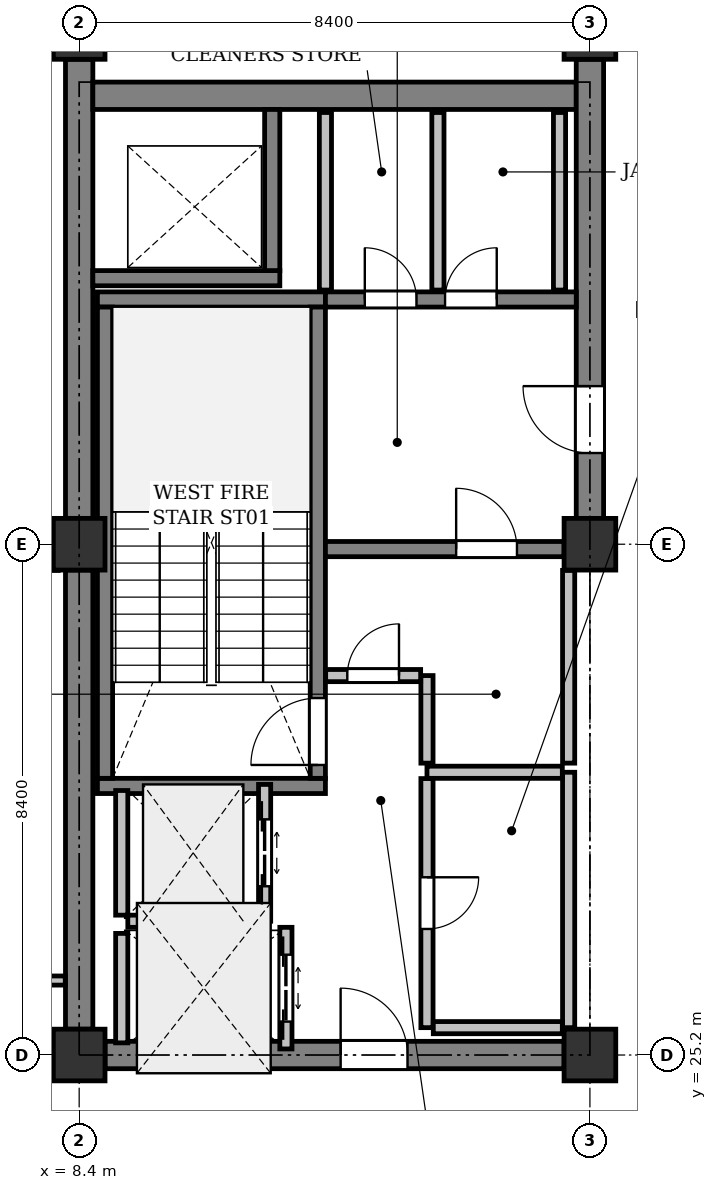
"""IFC4 building model, lengths in metres.
Left out: names, types, materials, properties, quantities, classifications, styles, units other than length and angle.
Written with IfcOpenShell. Run it as: python <this file> out.ifc"""

import sys

from ifc_helpers import new_model, si_unit, direction, frame, frame_2d, origin, origin_2d, place, context, subcontext, project, spatial, rectangle, extrude, element, fill, save


model = new_model("IFC4")
c1 = context("Model", 3, precision=1e-05, world=origin(), true_north=direction((0.0, 1.0)))
c2 = subcontext(c1, "Body", "Model", "MODEL_VIEW")
j1 = project(units=[si_unit("LENGTHUNIT", "METRE"), si_unit("PLANEANGLEUNIT", "RADIAN")], contexts=[c1])
p1 = place(None, origin())
s1 = spatial("IfcSite", under=j1, at=p1, CompositionType="ELEMENT")
p2 = place(p1, origin())
s2 = spatial("IfcBuilding", under=s1, at=p2, CompositionType="ELEMENT")
p3 = place(p2, frame((0.0, 0.0, 290.2)))
s3 = spatial("IfcBuildingStorey", under=s2, at=p3, CompositionType="ELEMENT", Elevation=290.2)
for number, where, z_axis, x_axis in (
    (1, (8.4, 25.2, 0.0), (0.0, 0.0, 1.0), (1.0, 0.0, 0.0)),
    (2, (8.4, 33.6, 0.0), (0.0, 0.0, 1.0), (1.0, 0.0, 0.0)),
    (3, (8.4, 42.0, 0.0), (0.0, 0.0, 1.0), (1.0, 0.0, 0.0)),
    (4, (16.8, 25.2, 0.0), (0.0, 0.0, 1.0), (1.0, 0.0, 0.0)),
    (5, (16.8, 33.6, 0.0), (0.0, 0.0, 1.0), (1.0, 0.0, 0.0)),
    (6, (16.8, 42.0, 0.0), (0.0, 0.0, 1.0), (1.0, 0.0, 0.0)),
):
    element("IfcColumn", number, at=place(p3, frame(where, z_axis=z_axis, x_axis=x_axis)), inside=s3, PredefinedType="COLUMN", context=c2, shape_type="SweptSolid", body=[
        extrude(rectangle(XDim=0.85, YDim=0.85, at=origin_2d()), origin(), (0.0, 0.0, 1.0), 4.0),
    ])
for number, where, z_axis, x_axis in (
    (7, (8.4, 25.625, 0.0), (0.0, 0.0, 1.0), (0.0, 1.0, 0.0)),
    (8, (8.4, 34.025, 0.0), (0.0, 0.0, 1.0), (0.0, 1.0, 0.0)),
):
    element("IfcWall", number, at=place(p3, frame(where, z_axis=z_axis, x_axis=x_axis)), inside=s3, PredefinedType="SHEAR", context=c2, shape_type="SweptSolid", body=[
        extrude(rectangle(XDim=7.55, YDim=0.45, at=frame_2d((3.775, 0.0))), origin(), (0.0, 0.0, 1.0), 3.725),
    ])
p4 = place(p3, frame((8.625, 40.975, 0.0), z_axis=(0.0, 0.0, 1.0), x_axis=(1.0, 0.0, 0.0)))
e9 = element("IfcWall", 9, at=p4, inside=s3, PredefinedType="SHEAR", context=c2, shape_type="SweptSolid", body=[
    extrude(rectangle(XDim=7.95, YDim=0.45, at=frame_2d((3.975, 0.0))), origin(), (0.0, 0.0, 1.0), 3.725),
])
p5 = place(p3, frame((16.8, 34.025, 0.0), z_axis=(0.0, 0.0, 1.0), x_axis=(0.0, 1.0, 0.0)))
e10 = element("IfcWall", 10, at=p5, inside=s3, PredefinedType="SHEAR", context=c2, shape_type="SweptSolid", body=[
    extrude(rectangle(XDim=7.55, YDim=0.45, at=frame_2d((3.775, 0.0))), origin(), (0.0, 0.0, 1.0), 3.725),
])
p6 = place(p5, frame((1.075, 0.0, 0.0)))
e11 = element("IfcOpeningElement", 11, at=p6, cuts=e10, PredefinedType="OPENING", context=c2, shape_type="SweptSolid", body=[
    extrude(rectangle(XDim=1.1, YDim=2.15, at=frame_2d((0.55, 1.075))), frame((0.0, 0.235, 0.0), z_axis=(0.0, -1.0, 0.0), x_axis=(1.0, 0.0, 0.0)), (0.0, 0.0, 1.0), 0.47),
])
p7 = place(p3, frame((8.825, 25.2, 0.0), z_axis=(0.0, 0.0, 1.0), x_axis=(1.0, 0.0, 0.0)))
e12 = element("IfcWall", 12, at=p7, inside=s3, PredefinedType="SHEAR", context=c2, shape_type="SweptSolid", body=[
    extrude(rectangle(XDim=7.55, YDim=0.45, at=frame_2d((3.775, 0.0))), origin(), (0.0, 0.0, 1.0), 3.725),
])
p8 = place(p7, frame((3.875, 0.0, 0.0)))
e13 = element("IfcOpeningElement", 13, at=p8, cuts=e12, PredefinedType="OPENING", context=c2, shape_type="SweptSolid", body=[
    extrude(rectangle(XDim=1.1, YDim=2.15, at=frame_2d((0.55, 1.075))), frame((0.0, 0.235, 0.0), z_axis=(0.0, -1.0, 0.0), x_axis=(1.0, 0.0, 0.0)), (0.0, 0.0, 1.0), 0.47),
])
for number, where, z_axis, x_axis in (
    (14, (12.45, 29.625, 0.0), (0.0, 0.0, 1.0), (-1.0, 0.0, 0.0)),
    (15, (12.45, 37.625, 0.0), (0.0, 0.0, 1.0), (-1.0, 0.0, 0.0)),
):
    element("IfcWall", number, at=place(p3, frame(where, z_axis=z_axis, x_axis=x_axis)), inside=s3, PredefinedType="SHEAR", context=c2, shape_type="SweptSolid", body=[
        extrude(rectangle(XDim=3.75, YDim=0.25, at=frame_2d((1.875, 0.0))), origin(), (0.0, 0.0, 1.0), 3.725),
    ])
p9 = place(p3, frame((12.325, 29.75, 0.0), z_axis=(0.0, 0.0, 1.0), x_axis=(0.0, 1.0, 0.0)))
e16 = element("IfcWall", 16, at=p9, inside=s3, PredefinedType="SHEAR", context=c2, shape_type="SweptSolid", body=[
    extrude(rectangle(XDim=7.75, YDim=0.25, at=frame_2d((3.875, 0.0))), origin(), (0.0, 0.0, 1.0), 3.725),
])
p10 = place(p9, frame((0.22, 0.0, 0.0)))
e17 = element("IfcOpeningElement", 17, at=p10, cuts=e16, PredefinedType="OPENING", context=c2, shape_type="SweptSolid", body=[
    extrude(rectangle(XDim=1.1, YDim=2.15, at=frame_2d((0.55, 1.075))), frame((0.0, 0.135, 0.0), z_axis=(0.0, -1.0, 0.0), x_axis=(1.0, 0.0, 0.0)), (0.0, 0.0, 1.0), 0.27),
])
p11 = place(p3, frame((8.825, 29.75, 0.0), z_axis=(0.0, 0.0, 1.0), x_axis=(0.0, 1.0, 0.0)))
e18 = element("IfcWall", 18, at=p11, inside=s3, PredefinedType="SHEAR", context=c2, shape_type="SweptSolid", body=[
    extrude(rectangle(XDim=7.75, YDim=0.25, at=frame_2d((3.875, 0.0))), origin(), (0.0, 0.0, 1.0), 3.725),
])
p12 = place(p3, frame((8.625, 37.975, 0.0), z_axis=(0.0, 0.0, 1.0), x_axis=(1.0, 0.0, 0.0)))
e19 = element("IfcWall", 19, at=p12, inside=s3, PredefinedType="SHEAR", context=c2, shape_type="SweptSolid", body=[
    extrude(rectangle(XDim=3.075, YDim=0.25, at=frame_2d((1.538, 0.0))), origin(), (0.0, 0.0, 1.0), 3.725),
])
p13 = place(p3, frame((11.575, 38.1, 0.0), z_axis=(0.0, 0.0, 1.0), x_axis=(0.0, 1.0, 0.0)))
e20 = element("IfcWall", 20, at=p13, inside=s3, PredefinedType="SHEAR", context=c2, shape_type="SweptSolid", body=[
    extrude(rectangle(XDim=2.65, YDim=0.25, at=frame_2d((1.325, 0.0))), origin(), (0.0, 0.0, 1.0), 3.725),
])
p14 = place(p3, frame((12.45, 33.52, 0.0), z_axis=(0.0, 0.0, 1.0), x_axis=(1.0, 0.0, 0.0)))
e21 = element("IfcWall", 21, at=p14, inside=s3, PredefinedType="SHEAR", context=c2, shape_type="SweptSolid", body=[
    extrude(rectangle(XDim=3.925, YDim=0.25, at=frame_2d((1.962, 0.0))), origin(), (0.0, 0.0, 1.0), 3.725),
])
p15 = place(p14, frame((2.15, 0.0, 0.0)))
e22 = element("IfcOpeningElement", 22, at=p15, cuts=e21, PredefinedType="OPENING", context=c2, shape_type="SweptSolid", body=[
    extrude(rectangle(XDim=1.0, YDim=2.15, at=frame_2d((0.5, 1.075))), frame((0.0, 0.135, 0.0), z_axis=(0.0, -1.0, 0.0), x_axis=(1.0, 0.0, 0.0)), (0.0, 0.0, 1.0), 0.27),
])
p16 = place(p3, frame((12.45, 37.625, 0.0), z_axis=(0.0, 0.0, 1.0), x_axis=(1.0, 0.0, 0.0)))
e23 = element("IfcWall", 23, at=p16, inside=s3, PredefinedType="SHEAR", context=c2, shape_type="SweptSolid", body=[
    extrude(rectangle(XDim=4.125, YDim=0.25, at=frame_2d((2.062, 0.0))), origin(), (0.0, 0.0, 1.0), 3.725),
])
p17 = place(p16, frame((0.647, 0.0, 0.0)))
e24 = element("IfcOpeningElement", 24, at=p17, cuts=e23, PredefinedType="OPENING", context=c2, shape_type="SweptSolid", body=[
    extrude(rectangle(XDim=0.85, YDim=2.15, at=frame_2d((0.425, 1.075))), frame((0.0, 0.135, 0.0), z_axis=(0.0, -1.0, 0.0), x_axis=(1.0, 0.0, 0.0)), (0.0, 0.0, 1.0), 0.27),
])
p18 = place(p16, frame((1.968, 0.0, 0.0)))
e25 = element("IfcOpeningElement", 25, at=p18, cuts=e23, PredefinedType="OPENING", context=c2, shape_type="SweptSolid", body=[
    extrude(rectangle(XDim=0.85, YDim=2.15, at=frame_2d((0.425, 1.075))), frame((0.0, 0.135, 0.0), z_axis=(0.0, -1.0, 0.0), x_axis=(1.0, 0.0, 0.0)), (0.0, 0.0, 1.0), 0.27),
])
p19 = place(p3, frame((11.45, 27.4, 0.0), z_axis=(0.0, 0.0, 1.0), x_axis=(0.0, 1.0, 0.0)))
e26 = element("IfcWall", 26, at=p19, inside=s3, PredefinedType="PARTITIONING", context=c2, shape_type="SweptSolid", body=[
    extrude(rectangle(XDim=2.25, YDim=0.2, at=frame_2d((1.125, 0.0))), origin(), (0.0, 0.0, 1.0), 3.725),
])
p20 = place(p19, frame((0.575, 0.0, 0.0)))
e27 = element("IfcOpeningElement", 27, at=p20, cuts=e26, PredefinedType="OPENING", context=c2, shape_type="SweptSolid", body=[
    extrude(rectangle(XDim=1.1, YDim=2.2, at=frame_2d((0.55, 1.1))), frame((0.0, 0.11, 0.0), z_axis=(0.0, -1.0, 0.0), x_axis=(1.0, 0.0, 0.0)), (0.0, 0.0, 1.0), 0.22),
])
p21 = place(p3, frame((9.1, 27.5, 0.0), z_axis=(0.0, 0.0, 1.0), x_axis=(0.0, 1.0, 0.0)))
e28 = element("IfcWall", 28, at=p21, inside=s3, PredefinedType="PARTITIONING", context=c2, shape_type="SweptSolid", body=[
    extrude(rectangle(XDim=2.05, YDim=0.2, at=frame_2d((1.025, 0.0))), origin(), (0.0, 0.0, 1.0), 3.725),
])
p22 = place(p3, frame((9.2, 27.4, 0.0), z_axis=(0.0, 0.0, 1.0), x_axis=(1.0, 0.0, 0.0)))
e29 = element("IfcWall", 29, at=p22, inside=s3, PredefinedType="PARTITIONING", context=c2, shape_type="SweptSolid", body=[
    extrude(rectangle(XDim=2.15, YDim=0.2, at=frame_2d((1.075, 0.0))), origin(), (0.0, 0.0, 1.0), 3.725),
])
p23 = place(p3, frame((11.8, 25.3, 0.0), z_axis=(0.0, 0.0, 1.0), x_axis=(0.0, 1.0, 0.0)))
e30 = element("IfcWall", 30, at=p23, inside=s3, PredefinedType="PARTITIONING", context=c2, shape_type="SweptSolid", body=[
    extrude(rectangle(XDim=2.0, YDim=0.2, at=frame_2d((1.0, 0.0))), origin(), (0.0, 0.0, 1.0), 3.725),
])
p24 = place(p23, frame((0.45, 0.0, 0.0)))
e31 = element("IfcOpeningElement", 31, at=p24, cuts=e30, PredefinedType="OPENING", context=c2, shape_type="SweptSolid", body=[
    extrude(rectangle(XDim=1.1, YDim=2.2, at=frame_2d((0.55, 1.1))), frame((0.0, 0.11, 0.0), z_axis=(0.0, -1.0, 0.0), x_axis=(1.0, 0.0, 0.0)), (0.0, 0.0, 1.0), 0.22),
])
p25 = place(p3, frame((9.1, 25.4, 0.0), z_axis=(0.0, 0.0, 1.0), x_axis=(0.0, 1.0, 0.0)))
e32 = element("IfcWall", 32, at=p25, inside=s3, PredefinedType="PARTITIONING", context=c2, shape_type="SweptSolid", body=[
    extrude(rectangle(XDim=1.8, YDim=0.2, at=frame_2d((0.9, 0.0))), origin(), (0.0, 0.0, 1.0), 3.725),
])
p26 = place(p3, frame((16.45, 25.65, 0.0), z_axis=(0.0, 0.0, 1.0), x_axis=(0.0, 1.0, 0.0)))
e33 = element("IfcWall", 33, at=p26, inside=s3, PredefinedType="PARTITIONING", context=c2, shape_type="SweptSolid", body=[
    extrude(rectangle(XDim=4.2, YDim=0.2, at=frame_2d((2.1, 0.0))), origin(), (0.0, 0.0, 1.0), 3.725),
])
p27 = place(p3, frame((16.346, 29.85, 0.0), z_axis=(0.0, 0.0, 1.0), x_axis=(-1.0, 0.0, 0.0)))
e34 = element("IfcWall", 34, at=p27, inside=s3, PredefinedType="PARTITIONING", context=c2, shape_type="SweptSolid", body=[
    extrude(rectangle(XDim=2.226, YDim=0.2, at=frame_2d((1.113, 0.0))), origin(), (0.0, 0.0, 1.0), 3.725),
])
p28 = place(p3, frame((14.12, 29.746, 0.0), z_axis=(0.0, 0.0, 1.0), x_axis=(0.0, -1.0, 0.0)))
e35 = element("IfcWall", 35, at=p28, inside=s3, PredefinedType="PARTITIONING", context=c2, shape_type="SweptSolid", body=[
    extrude(rectangle(XDim=4.096, YDim=0.2, at=frame_2d((2.048, 0.0))), origin(), (0.0, 0.0, 1.0), 3.725),
])
p29 = place(p28, frame((1.623, 0.0, 0.0)))
e36 = element("IfcOpeningElement", 36, at=p29, cuts=e35, PredefinedType="OPENING", context=c2, shape_type="SweptSolid", body=[
    extrude(rectangle(XDim=0.85, YDim=2.15, at=frame_2d((0.425, 1.075))), frame((0.0, 0.11, 0.0), z_axis=(0.0, -1.0, 0.0), x_axis=(1.0, 0.0, 0.0)), (0.0, 0.0, 1.0), 0.22),
])
p30 = place(p3, frame((14.224, 25.65, 0.0), z_axis=(0.0, 0.0, 1.0), x_axis=(1.0, 0.0, 0.0)))
e37 = element("IfcWall", 37, at=p30, inside=s3, PredefinedType="PARTITIONING", context=c2, shape_type="SweptSolid", body=[
    extrude(rectangle(XDim=2.122, YDim=0.2, at=frame_2d((1.061, 0.0))), origin(), (0.0, 0.0, 1.0), 3.725),
])
p31 = place(p3, frame((14.12, 31.44, 0.0), z_axis=(0.0, 0.0, 1.0), x_axis=(0.0, -1.0, 0.0)))
e38 = element("IfcWall", 38, at=p31, inside=s3, PredefinedType="PARTITIONING", context=c2, shape_type="SweptSolid", body=[
    extrude(rectangle(XDim=1.44, YDim=0.2, at=frame_2d((0.72, 0.0))), origin(), (0.0, 0.0, 1.0), 3.725),
])
p32 = place(p3, frame((16.45, 30.0, 0.0), z_axis=(0.0, 0.0, 1.0), x_axis=(0.0, 1.0, 0.0)))
e39 = element("IfcWall", 39, at=p32, inside=s3, PredefinedType="PARTITIONING", context=c2, shape_type="SweptSolid", body=[
    extrude(rectangle(XDim=3.17, YDim=0.2, at=frame_2d((1.585, 0.0))), origin(), (0.0, 0.0, 1.0), 3.725),
])
p33 = place(p3, frame((12.454, 31.44, 0.0), z_axis=(0.0, 0.0, 1.0), x_axis=(1.0, 0.0, 0.0)))
e40 = element("IfcWall", 40, at=p33, inside=s3, PredefinedType="PARTITIONING", context=c2, shape_type="SweptSolid", body=[
    extrude(rectangle(XDim=1.562, YDim=0.2, at=frame_2d((0.781, 0.0))), origin(), (0.0, 0.0, 1.0), 3.725),
])
p34 = place(p33, frame((0.356, 0.0, 0.0)))
e41 = element("IfcOpeningElement", 41, at=p34, cuts=e40, PredefinedType="OPENING", context=c2, shape_type="SweptSolid", body=[
    extrude(rectangle(XDim=0.85, YDim=2.15, at=frame_2d((0.425, 1.075))), frame((0.0, 0.11, 0.0), z_axis=(0.0, -1.0, 0.0), x_axis=(1.0, 0.0, 0.0)), (0.0, 0.0, 1.0), 0.22),
])
for number, where, z_axis, x_axis in (
    (42, (14.3, 37.78, 0.0), (0.0, 0.0, 1.0), (0.0, 1.0, 0.0)),
    (43, (12.45, 40.7, 0.0), (0.0, 0.0, 1.0), (0.0, -1.0, 0.0)),
    (44, (16.3, 37.78, 0.0), (0.0, 0.0, 1.0), (0.0, 1.0, 0.0)),
):
    element("IfcWall", number, at=place(p3, frame(where, z_axis=z_axis, x_axis=x_axis)), inside=s3, PredefinedType="PARTITIONING", context=c2, shape_type="SweptSolid", body=[
        extrude(rectangle(XDim=2.92, YDim=0.2, at=frame_2d((1.46, 0.0))), origin(), (0.0, 0.0, 1.0), 2.775),
    ])
p35 = place(p3, frame((5.4, 25.26, 0.0), z_axis=(0.0, 0.0, 1.0), x_axis=(1.0, 0.0, 0.0)))
e45 = element("IfcWall", 45, at=p35, inside=s3, PredefinedType="PARTITIONING", context=c2, shape_type="SweptSolid", body=[
    extrude(rectangle(XDim=2.555, YDim=0.12, at=frame_2d((1.278, 0.0))), origin(), (0.0, 0.0, 1.0), 3.271),
])
p36 = place(p3, frame((8.171, 26.425, 0.0), z_axis=(0.0, 0.0, 1.0), x_axis=(-1.0, 0.0, 0.0)))
e46 = element("IfcWall", 46, at=p36, inside=s3, PredefinedType="PARTITIONING", context=c2, shape_type="SweptSolid", body=[
    extrude(rectangle(XDim=8.002, YDim=0.15, at=frame_2d((4.001, 0.0))), origin(), (0.0, 0.0, 1.0), 3.421),
])
p37 = place(p3, frame((7.956, 33.169, 0.0), z_axis=(0.0, 0.0, 1.0), x_axis=(-0.000855919801, 0.999999633701, 0.0)))
e47 = element("IfcWall", 47, at=p37, inside=s3, PredefinedType="PARTITIONING", context=c2, shape_type="SweptSolid", body=[
    extrude(rectangle(XDim=0.856, YDim=0.2, at=frame_2d((0.428, 0.0))), origin(), (0.0, 0.0, 1.0), 3.271),
])
p38 = place(p6, origin())
e48 = element("IfcDoor", 48, at=p38, inside=s3, OperationType="SINGLE_SWING_RIGHT", PredefinedType="DOOR", context=c2, shape_type="SweptSolid", body=[
    extrude(rectangle(XDim=1.1, YDim=2.15, at=frame_2d((0.55, 1.075))), frame((0.0, 0.025, 0.0), z_axis=(0.0, -1.0, 0.0), x_axis=(1.0, 0.0, 0.0)), (0.0, 0.0, 1.0), 0.05),
])
fill(e11, e48)
p39 = place(p8, origin())
e49 = element("IfcDoor", 49, at=p39, inside=s3, OperationType="SINGLE_SWING_LEFT", PredefinedType="DOOR", context=c2, shape_type="SweptSolid", body=[
    extrude(rectangle(XDim=1.1, YDim=2.15, at=frame_2d((0.55, 1.075))), frame((0.0, 0.025, 0.0), z_axis=(0.0, -1.0, 0.0), x_axis=(1.0, 0.0, 0.0)), (0.0, 0.0, 1.0), 0.05),
])
fill(e13, e49)
p40 = place(p10, origin())
e50 = element("IfcDoor", 50, at=p40, inside=s3, OperationType="SINGLE_SWING_LEFT", PredefinedType="DOOR", context=c2, shape_type="SweptSolid", body=[
    extrude(rectangle(XDim=1.1, YDim=2.15, at=frame_2d((0.55, 1.075))), frame((0.0, 0.025, 0.0), z_axis=(0.0, -1.0, 0.0), x_axis=(1.0, 0.0, 0.0)), (0.0, 0.0, 1.0), 0.05),
])
fill(e17, e50)
p41 = place(p15, origin())
e51 = element("IfcDoor", 51, at=p41, inside=s3, OperationType="SINGLE_SWING_LEFT", PredefinedType="DOOR", context=c2, shape_type="SweptSolid", body=[
    extrude(rectangle(XDim=1.0, YDim=2.15, at=frame_2d((0.5, 1.075))), frame((0.0, 0.025, 0.0), z_axis=(0.0, -1.0, 0.0), x_axis=(1.0, 0.0, 0.0)), (0.0, 0.0, 1.0), 0.05),
])
fill(e22, e51)
p42 = place(p20, origin())
e52 = element("IfcDoor", 52, at=p42, inside=s3, OperationType="DOUBLE_DOOR_SLIDING", PredefinedType="DOOR", context=c2, shape_type="SweptSolid", body=[
    extrude(rectangle(XDim=1.1, YDim=2.2, at=frame_2d((0.55, 1.1))), frame((0.0, 0.025, 0.0), z_axis=(0.0, -1.0, 0.0), x_axis=(1.0, 0.0, 0.0)), (0.0, 0.0, 1.0), 0.05),
])
fill(e27, e52)
p43 = place(p24, origin())
e53 = element("IfcDoor", 53, at=p43, inside=s3, OperationType="DOUBLE_DOOR_SLIDING", PredefinedType="DOOR", context=c2, shape_type="SweptSolid", body=[
    extrude(rectangle(XDim=1.1, YDim=2.2, at=frame_2d((0.55, 1.1))), frame((0.0, 0.025, 0.0), z_axis=(0.0, -1.0, 0.0), x_axis=(1.0, 0.0, 0.0)), (0.0, 0.0, 1.0), 0.05),
])
fill(e31, e53)
p44 = place(p29, origin())
e54 = element("IfcDoor", 54, at=p44, inside=s3, OperationType="SINGLE_SWING_LEFT", PredefinedType="DOOR", context=c2, shape_type="SweptSolid", body=[
    extrude(rectangle(XDim=0.85, YDim=2.15, at=frame_2d((0.425, 1.075))), frame((0.0, 0.025, 0.0), z_axis=(0.0, -1.0, 0.0), x_axis=(1.0, 0.0, 0.0)), (0.0, 0.0, 1.0), 0.05),
])
fill(e36, e54)
p45 = place(p34, origin())
e55 = element("IfcDoor", 55, at=p45, inside=s3, OperationType="SINGLE_SWING_RIGHT", PredefinedType="DOOR", context=c2, shape_type="SweptSolid", body=[
    extrude(rectangle(XDim=0.85, YDim=2.15, at=frame_2d((0.425, 1.075))), frame((0.0, 0.025, 0.0), z_axis=(0.0, -1.0, 0.0), x_axis=(1.0, 0.0, 0.0)), (0.0, 0.0, 1.0), 0.05),
])
fill(e41, e55)
p46 = place(p17, origin())
e56 = element("IfcDoor", 56, at=p46, inside=s3, OperationType="SINGLE_SWING_LEFT", PredefinedType="DOOR", context=c2, shape_type="SweptSolid", body=[
    extrude(rectangle(XDim=0.85, YDim=2.15, at=frame_2d((0.425, 1.075))), frame((0.0, 0.025, 0.0), z_axis=(0.0, -1.0, 0.0), x_axis=(1.0, 0.0, 0.0)), (0.0, 0.0, 1.0), 0.05),
])
fill(e24, e56)
p47 = place(p18, origin())
e57 = element("IfcDoor", 57, at=p47, inside=s3, OperationType="SINGLE_SWING_RIGHT", PredefinedType="DOOR", context=c2, shape_type="SweptSolid", body=[
    extrude(rectangle(XDim=0.85, YDim=2.15, at=frame_2d((0.425, 1.075))), frame((0.0, 0.025, 0.0), z_axis=(0.0, -1.0, 0.0), x_axis=(1.0, 0.0, 0.0)), (0.0, 0.0, 1.0), 0.05),
])
fill(e25, e57)
save(model, sys.argv[1])
